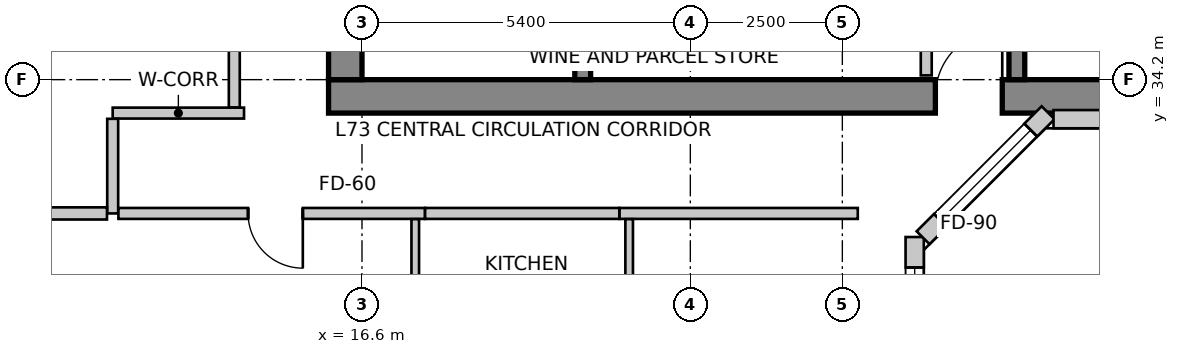
"""IFC4 building model, lengths in metres.
Left out: names, types, materials, properties, quantities, classifications, styles, units other than length and angle.
Written with IfcOpenShell. Run it as: python <this file> out.ifc"""

import sys

from ifc_helpers import new_model, si_unit, direction, frame, frame_2d, origin, place, context, subcontext, project, spatial, rectangle, extrude, source, transform, mapped, element, fill, save


model = new_model("IFC4")
c1 = context("Model", 3, precision=1e-05, world=origin(), true_north=direction((0.0, 1.0)))
c2 = subcontext(c1, "Body", "Model", "MODEL_VIEW")
j1 = project(units=[si_unit("LENGTHUNIT", "METRE"), si_unit("PLANEANGLEUNIT", "RADIAN")], contexts=[c1])
p1 = place(None, origin())
s1 = spatial("IfcSite", under=j1, at=p1, CompositionType="ELEMENT")
p2 = place(p1, origin())
s2 = spatial("IfcBuilding", under=s1, at=p2, CompositionType="ELEMENT")
p3 = place(p2, frame((0.0, 0.0, 285.3)))
s3 = spatial("IfcBuildingStorey", under=s2, at=p3, CompositionType="ELEMENT", Elevation=285.3)
p4 = place(p3, frame((16.05, 33.925, 0.0), z_axis=(0.0, 0.0, 1.0), x_axis=(1.0, 0.0, 0.0)))
e1 = element("IfcWall", 1, at=p4, inside=s3, PredefinedType="SHEAR", context=c2, shape_type="SweptSolid", body=[
    extrude(rectangle(XDim=15.5, YDim=0.55, at=frame_2d((7.75, 0.0))), origin(), (0.0, 0.0, 1.0), 3.6),
])
m1 = source(origin(), c2, "Body", "SweptSolid", [
    extrude(rectangle(XDim=1.1, YDim=2.15, at=frame_2d((0.55, 1.075))), frame((0.0, 0.285, 0.0), z_axis=(0.0, -1.0, 0.0), x_axis=(1.0, 0.0, 0.0)), (0.0, 0.0, 1.0), 0.57),
])
p5 = place(p4, frame((9.98, 0.0, 0.0)))
e2 = element("IfcOpeningElement", 2, at=p5, cuts=e1, PredefinedType="OPENING", context=c2, shape_type="MappedRepresentation", body=[
    mapped(m1, transform((0.0, 0.0, 0.0), scale=1.0)),
])
p6 = place(p3, frame((16.325, 34.2, 0.0), z_axis=(0.0, 0.0, 1.0), x_axis=(0.0, 1.0, 0.0)))
e3 = element("IfcWall", 3, at=p6, inside=s3, PredefinedType="SHEAR", context=c2, shape_type="SweptSolid", body=[
    extrude(rectangle(XDim=11.4, YDim=0.55, at=frame_2d((5.7, 0.0))), origin(), (0.0, 0.0, 1.0), 3.6),
])
p7 = place(p6, frame((7.15, 0.0, 0.0)))
e4 = element("IfcOpeningElement", 4, at=p7, cuts=e3, PredefinedType="OPENING", context=c2, shape_type="MappedRepresentation", body=[
    mapped(m1, transform((0.0, 0.0, 0.0), scale=1.0)),
])
p8 = place(p3, frame((20.23, 34.2, 0.0), z_axis=(0.0, 0.0, 1.0), x_axis=(0.0, 1.0, 0.0)))
e5 = element("IfcWall", 5, at=p8, inside=s3, PredefinedType="SHEAR", context=c2, shape_type="SweptSolid", body=[
    extrude(rectangle(XDim=9.06, YDim=0.26, at=frame_2d((4.53, 0.0))), origin(), (0.0, 0.0, 1.0), 3.6),
])
m2 = source(origin(), c2, "Body", "SweptSolid", [
    extrude(rectangle(XDim=1.1, YDim=2.15, at=frame_2d((0.55, 1.075))), frame((0.0, 0.14, 0.0), z_axis=(0.0, -1.0, 0.0), x_axis=(1.0, 0.0, 0.0)), (0.0, 0.0, 1.0), 0.28),
])
p9 = place(p8, frame((7.45, 0.0, 0.0)))
e6 = element("IfcOpeningElement", 6, at=p9, cuts=e5, PredefinedType="OPENING", context=c2, shape_type="MappedRepresentation", body=[
    mapped(m2, transform((0.0, 0.0, 0.0), scale=1.0)),
])
p10 = place(p3, frame((27.37, 34.2, 0.0), z_axis=(0.0, 0.0, 1.0), x_axis=(0.0, 1.0, 0.0)))
e7 = element("IfcWall", 7, at=p10, inside=s3, PredefinedType="SHEAR", context=c2, shape_type="SweptSolid", body=[
    extrude(rectangle(XDim=9.06, YDim=0.26, at=frame_2d((4.53, 0.0))), origin(), (0.0, 0.0, 1.0), 3.6),
])
p11 = place(p10, frame((7.45, 0.0, 0.0)))
e8 = element("IfcOpeningElement", 8, at=p11, cuts=e7, PredefinedType="OPENING", context=c2, shape_type="MappedRepresentation", body=[
    mapped(m2, transform((0.0, 0.0, 0.0), scale=1.0)),
])
p12 = place(p3, frame((25.69, 24.957, 0.0), z_axis=(0.0, 0.0, 1.0), x_axis=(0.0, 1.0, 0.0)))
e9 = element("IfcWall", 9, at=p12, inside=s3, PredefinedType="SOLIDWALL", context=c2, shape_type="SweptSolid", body=[
    extrude(rectangle(XDim=6.655, YDim=0.3, at=frame_2d((3.327, 0.0))), origin(), (0.0, 0.0, 1.0), 3.35),
])
m3 = source(origin(), c2, "Body", "SweptSolid", [
    extrude(rectangle(XDim=1.6, YDim=2.15, at=frame_2d((0.8, 1.075))), frame((0.0, 0.16, 0.0), z_axis=(0.0, -1.0, 0.0), x_axis=(1.0, 0.0, 0.0)), (0.0, 0.0, 1.0), 0.32),
])
p13 = place(p12, frame((2.293, 0.0, 0.0)))
e10 = element("IfcOpeningElement", 10, at=p13, cuts=e9, PredefinedType="OPENING", context=c2, shape_type="MappedRepresentation", body=[
    mapped(m3, transform((0.0, 0.0, 0.0), scale=1.0)),
])
m4 = source(origin(), c2, "Body", "SweptSolid", [
    extrude(rectangle(XDim=0.9, YDim=1.6, at=frame_2d((0.45, 0.8))), frame((0.0, 0.16, 0.0), z_axis=(0.0, -1.0, 0.0), x_axis=(1.0, 0.0, 0.0)), (0.0, 0.0, 1.0), 0.32),
])
p14 = place(p12, frame((0.563, 0.0, 0.85)))
e11 = element("IfcOpeningElement", 11, at=p14, cuts=e9, PredefinedType="OPENING", context=c2, shape_type="MappedRepresentation", body=[
    mapped(m4, transform((0.0, 0.0, 0.0), scale=1.0)),
])
m5 = source(origin(), c2, "Body", "SweptSolid", [
    extrude(rectangle(XDim=1.8, YDim=2.1, at=frame_2d((0.9, 1.05))), frame((0.0, 0.16, 0.0), z_axis=(0.0, -1.0, 0.0), x_axis=(1.0, 0.0, 0.0)), (0.0, 0.0, 1.0), 0.32),
])
p15 = place(p12, frame((4.354, 0.0, 0.85)))
e12 = element("IfcOpeningElement", 12, at=p15, cuts=e9, PredefinedType="OPENING", context=c2, shape_type="MappedRepresentation", body=[
    mapped(m5, transform((0.0, 0.0, 0.0), scale=1.0)),
])
p16 = place(p3, frame((25.828, 31.6, 0.0), z_axis=(0.0, 0.0, 1.0), x_axis=(0.707106781187, 0.707106781187, 0.0)))
e13 = element("IfcWall", 13, at=p16, inside=s3, PredefinedType="SOLIDWALL", context=c2, shape_type="SweptSolid", body=[
    extrude(rectangle(XDim=2.907, YDim=0.3, at=frame_2d((1.454, 0.0))), origin(), (0.0, 0.0, 1.0), 3.35),
])
m6 = source(origin(), c2, "Body", "SweptSolid", [
    extrude(rectangle(XDim=2.1, YDim=2.0, at=frame_2d((1.05, 1.0))), frame((0.0, 0.16, 0.0), z_axis=(0.0, -1.0, 0.0), x_axis=(1.0, 0.0, 0.0)), (0.0, 0.0, 1.0), 0.32),
])
p17 = place(p16, frame((0.404, 0.0, 0.85)))
e14 = element("IfcOpeningElement", 14, at=p17, cuts=e13, PredefinedType="OPENING", context=c2, shape_type="MappedRepresentation", body=[
    mapped(m6, transform((0.0, 0.0, 0.0), scale=1.0)),
])
p18 = place(p3, frame((27.973, 33.55, 0.0), z_axis=(0.0, 0.0, 1.0), x_axis=(1.0, 0.0, 0.0)))
e15 = element("IfcWall", 15, at=p18, inside=s3, PredefinedType="SOLIDWALL", context=c2, shape_type="SweptSolid", body=[
    extrude(rectangle(XDim=9.115, YDim=0.3, at=frame_2d((4.558, 0.0))), origin(), (0.0, 0.0, 1.0), 3.35),
])
p19 = place(p18, frame((1.389, 0.0, 0.85)))
e16 = element("IfcOpeningElement", 16, at=p19, cuts=e15, PredefinedType="OPENING", context=c2, shape_type="MappedRepresentation", body=[
    mapped(m6, transform((0.0, 0.0, 0.0), scale=1.0)),
])
m7 = source(origin(), c2, "Body", "SweptSolid", [
    extrude(rectangle(XDim=2.4, YDim=2.2, at=frame_2d((1.2, 1.1))), frame((0.0, 0.16, 0.0), z_axis=(0.0, -1.0, 0.0), x_axis=(1.0, 0.0, 0.0)), (0.0, 0.0, 1.0), 0.32),
])
p20 = place(p18, frame((5.476, 0.0, 0.85)))
e17 = element("IfcOpeningElement", 17, at=p20, cuts=e15, PredefinedType="OPENING", context=c2, shape_type="MappedRepresentation", body=[
    mapped(m7, transform((0.0, 0.0, 0.0), scale=1.0)),
])
p21 = place(p3, frame((25.88, 35.956, 0.0), z_axis=(0.0, 0.0, 1.0), x_axis=(0.0, -1.0, 0.0)))
e18 = element("IfcWall", 18, at=p21, inside=s3, PredefinedType="PARTITIONING", context=c2, shape_type="SweptSolid", body=[
    extrude(rectangle(XDim=1.686, YDim=0.18, at=frame_2d((0.843, 0.0))), origin(), (0.0, 0.0, 1.0), 2.642),
])
p22 = place(p3, frame((12.5, 33.65, 0.0), z_axis=(0.0, 0.0, 1.0), x_axis=(1.0, 0.0, 0.0)))
e19 = element("IfcWall", 19, at=p22, inside=s3, PredefinedType="PARTITIONING", context=c2, shape_type="SweptSolid", body=[
    extrude(rectangle(XDim=2.16, YDim=0.18, at=frame_2d((1.08, 0.0))), origin(), (0.0, 0.0, 1.0), 3.35),
])
p23 = place(p3, frame((12.5, 32.0, 0.0), z_axis=(0.0, 0.0, 1.0), x_axis=(0.0, 1.0, 0.0)))
e20 = element("IfcWall", 20, at=p23, inside=s3, PredefinedType="PARTITIONING", context=c2, shape_type="SweptSolid", body=[
    extrude(rectangle(XDim=1.556, YDim=0.18, at=frame_2d((0.778, 0.0))), origin(), (0.0, 0.0, 1.0), 3.019),
])
p24 = place(p3, frame((24.754, 32.0, 0.0), z_axis=(0.0, 0.0, 1.0), x_axis=(-1.0, 0.0, 0.0)))
e21 = element("IfcWall", 21, at=p24, inside=s3, PredefinedType="PARTITIONING", context=c2, shape_type="SweptSolid", body=[
    extrude(rectangle(XDim=3.92, YDim=0.18, at=frame_2d((1.96, 0.0))), origin(), (0.0, 0.0, 1.0), 3.019),
])
p25 = place(p3, frame((17.636, 32.0, 0.0), z_axis=(0.0, 0.0, 1.0), x_axis=(-1.0, 0.0, 0.0)))
e22 = element("IfcWall", 22, at=p25, inside=s3, PredefinedType="PARTITIONING", context=c2, shape_type="SweptSolid", body=[
    extrude(rectangle(XDim=5.042, YDim=0.18, at=frame_2d((2.521, 0.0))), origin(), (0.0, 0.0, 1.0), 3.019),
])
m8 = source(origin(), c2, "Body", "SweptSolid", [
    extrude(rectangle(XDim=0.9, YDim=2.15, at=frame_2d((0.45, 1.075))), frame((0.0, 0.1, 0.0), z_axis=(0.0, -1.0, 0.0), x_axis=(1.0, 0.0, 0.0)), (0.0, 0.0, 1.0), 0.2),
])
p26 = place(p25, frame((2.009, 0.0, 0.0)))
e23 = element("IfcOpeningElement", 23, at=p26, cuts=e22, PredefinedType="OPENING", context=c2, shape_type="MappedRepresentation", body=[
    mapped(m8, transform((0.0, 0.0, 0.0), scale=1.0)),
])
p27 = place(p3, frame((20.832, 32.0, 0.0), z_axis=(0.0, 0.0, 1.0), x_axis=(-1.0, 0.0, 0.0)))
e24 = element("IfcWall", 24, at=p27, inside=s3, PredefinedType="PARTITIONING", context=c2, shape_type="SweptSolid", body=[
    extrude(rectangle(XDim=3.194, YDim=0.18, at=frame_2d((1.597, 0.0))), origin(), (0.0, 0.0, 1.0), 3.35),
])
p28 = place(p3, frame((14.5, 33.744, 0.0), z_axis=(0.0, 0.0, 1.0), x_axis=(0.0, 1.0, 0.0)))
e25 = element("IfcWall", 25, at=p28, inside=s3, PredefinedType="PARTITIONING", context=c2, shape_type="SweptSolid", body=[
    extrude(rectangle(XDim=12.406, YDim=0.18, at=frame_2d((6.203, 0.0))), origin(), (0.0, 0.0, 1.0), 3.35),
])
p29 = place(p28, frame((4.37, 0.0, 0.0)))
e26 = element("IfcOpeningElement", 26, at=p29, cuts=e25, PredefinedType="OPENING", context=c2, shape_type="MappedRepresentation", body=[
    mapped(m8, transform((0.0, 0.0, 0.0), scale=1.0)),
])
p30 = place(p3, frame((12.406, 32.0, 0.0), z_axis=(0.0, 0.0, 1.0), x_axis=(-1.0, 0.0, 0.0)))
e27 = element("IfcWall", 27, at=p30, inside=s3, PredefinedType="PARTITIONING", context=c2, shape_type="SweptSolid", body=[
    extrude(rectangle(XDim=4.126, YDim=0.2, at=frame_2d((2.063, 0.0))), origin(), (0.0, 0.0, 1.0), 2.642),
])
p31 = place(p3, frame((20.994, 26.883, 0.0), z_axis=(0.0, 0.0, 1.0), x_axis=(0.0, 1.0, 0.0)))
e28 = element("IfcWall", 28, at=p31, inside=s3, PredefinedType="PARTITIONING", context=c2, shape_type="SweptSolid", body=[
    extrude(rectangle(XDim=5.023, YDim=0.125, at=frame_2d((2.511, 0.0))), origin(), (0.0, 0.0, 1.0), 2.979),
])
m9 = source(origin(), c2, "Body", "SweptSolid", [
    extrude(rectangle(XDim=0.9, YDim=2.15, at=frame_2d((0.45, 1.075))), frame((0.0, 0.073, 0.0), z_axis=(0.0, -1.0, 0.0), x_axis=(1.0, 0.0, 0.0)), (0.0, 0.0, 1.0), 0.145),
])
p32 = place(p31, frame((2.0, 0.0, 0.0)))
e29 = element("IfcOpeningElement", 29, at=p32, cuts=e28, PredefinedType="OPENING", context=c2, shape_type="MappedRepresentation", body=[
    mapped(m9, transform((0.0, 0.0, 0.0), scale=1.0)),
])
p33 = place(p3, frame((17.476, 31.906, 0.0), z_axis=(0.0, 0.0, 1.0), x_axis=(0.0, -1.0, 0.0)))
e30 = element("IfcWall", 30, at=p33, inside=s3, PredefinedType="PARTITIONING", context=c2, shape_type="SweptSolid", body=[
    extrude(rectangle(XDim=5.023, YDim=0.125, at=frame_2d((2.511, 0.0))), origin(), (0.0, 0.0, 1.0), 2.979),
])
m10 = source(origin(), c2, "Body", "SweptSolid", [
    extrude(rectangle(XDim=0.85, YDim=2.15, at=frame_2d((0.425, 1.075))), frame((0.0, 0.073, 0.0), z_axis=(0.0, -1.0, 0.0), x_axis=(1.0, 0.0, 0.0)), (0.0, 0.0, 1.0), 0.145),
])
p34 = place(p33, frame((2.086, 0.0, 0.0)))
e31 = element("IfcOpeningElement", 31, at=p34, cuts=e30, PredefinedType="OPENING", context=c2, shape_type="MappedRepresentation", body=[
    mapped(m10, transform((0.0, 0.0, 0.0), scale=1.0)),
])
m11 = source(origin(), c2, "Body", "SweptSolid", [
    extrude(rectangle(XDim=1.8, YDim=2.1, at=frame_2d((0.9, 1.05))), frame((0.0, -0.015, 0.0), z_axis=(0.0, -1.0, 0.0), x_axis=(1.0, 0.0, 0.0)), (0.0, 0.0, 1.0), 0.06),
])
p35 = place(p15, origin())
e32 = element("IfcWindow", 32, at=p35, inside=s3, PartitioningType="SINGLE_PANEL", PredefinedType="WINDOW", context=c2, shape_type="MappedRepresentation", body=[
    mapped(m11, transform((0.0, 0.0, 0.0), scale=1.0)),
])
fill(e12, e32)
m12 = source(origin(), c2, "Body", "SweptSolid", [
    extrude(rectangle(XDim=2.1, YDim=2.0, at=frame_2d((1.05, 1.0))), frame((0.0, -0.015, 0.0), z_axis=(0.0, -1.0, 0.0), x_axis=(1.0, 0.0, 0.0)), (0.0, 0.0, 1.0), 0.06),
])
p36 = place(p17, origin())
e33 = element("IfcWindow", 33, at=p36, inside=s3, PartitioningType="SINGLE_PANEL", PredefinedType="WINDOW", context=c2, shape_type="MappedRepresentation", body=[
    mapped(m12, transform((0.0, 0.0, 0.0), scale=1.0)),
])
fill(e14, e33)
m13 = source(origin(), c2, "Body", "SweptSolid", [
    extrude(rectangle(XDim=1.1, YDim=2.15, at=frame_2d((0.55, 1.075))), frame((0.0, 0.025, 0.0), z_axis=(0.0, -1.0, 0.0), x_axis=(1.0, 0.0, 0.0)), (0.0, 0.0, 1.0), 0.05),
])
p37 = place(p5, origin())
e34 = element("IfcDoor", 34, at=p37, inside=s3, OperationType="SINGLE_SWING_RIGHT", PredefinedType="DOOR", context=c2, shape_type="MappedRepresentation", body=[
    mapped(m13, transform((0.0, 0.0, 0.0), scale=1.0)),
])
fill(e2, e34)
m14 = source(origin(), c2, "Body", "SweptSolid", [
    extrude(rectangle(XDim=0.9, YDim=2.15, at=frame_2d((0.45, 1.075))), frame((0.0, 0.025, 0.0), z_axis=(0.0, -1.0, 0.0), x_axis=(1.0, 0.0, 0.0)), (0.0, 0.0, 1.0), 0.05),
])
p38 = place(p26, origin())
e35 = element("IfcDoor", 35, at=p38, inside=s3, OperationType="SINGLE_SWING_LEFT", PredefinedType="DOOR", context=c2, shape_type="MappedRepresentation", body=[
    mapped(m14, transform((0.0, 0.0, 0.0), scale=1.0)),
])
fill(e23, e35)
save(model, sys.argv[1])
